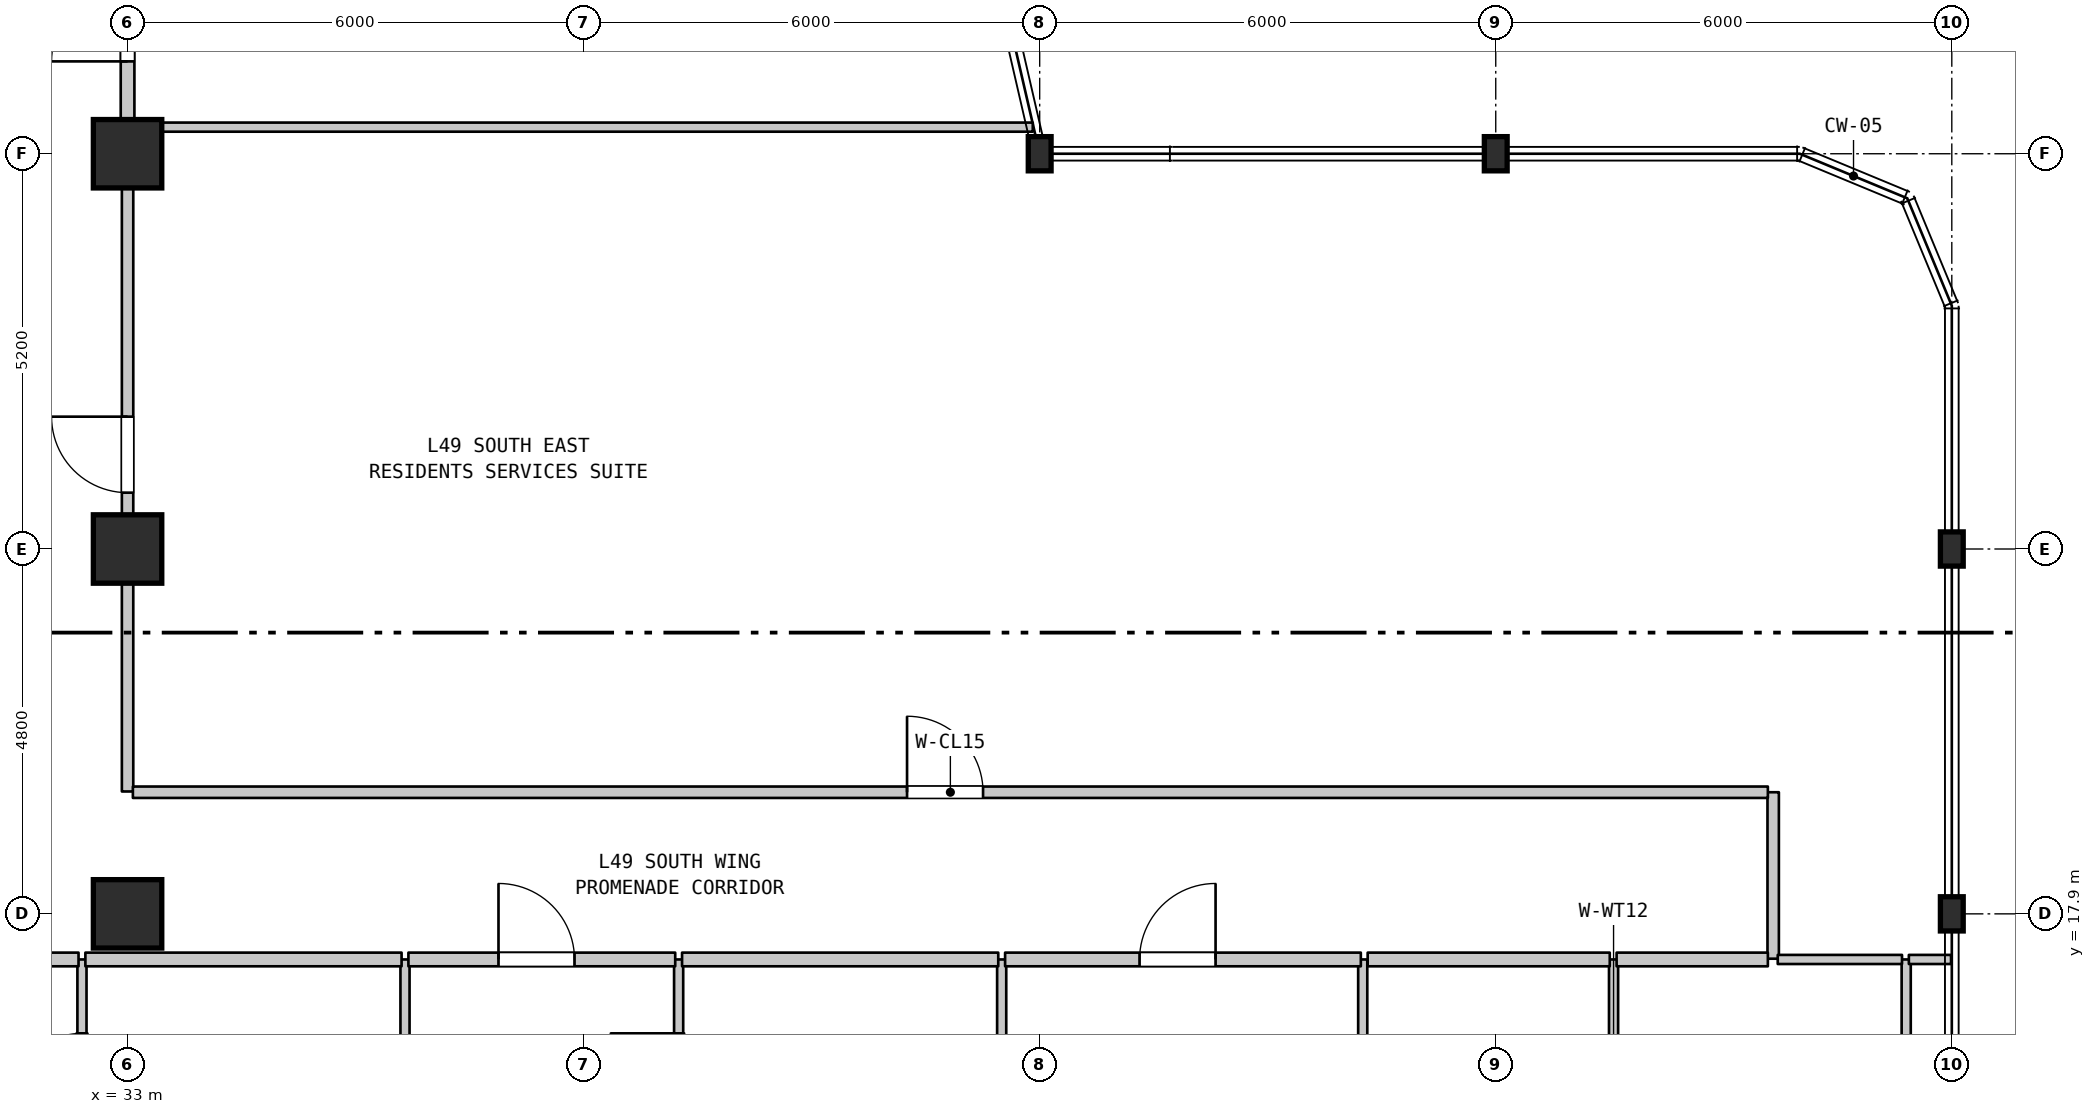
"""IFC4 building model, lengths in metres.
Left out: names, types, materials, properties, quantities, classifications, styles, units other than length and angle.
Written with IfcOpenShell. Run it as: python <this file> out.ifc"""

import sys

from ifc_helpers import new_model, si_unit, direction, frame, frame_2d, origin, origin_2d, place, context, subcontext, project, spatial, rectangle, i_section, extrude, element, fill, save


model = new_model("IFC4")
c1 = context("Model", 3, precision=1e-05, world=origin(), true_north=direction((0.0, 1.0)))
c2 = subcontext(c1, "Body", "Model", "MODEL_VIEW")
j1 = project(units=[si_unit("LENGTHUNIT", "METRE"), si_unit("PLANEANGLEUNIT", "RADIAN")], contexts=[c1])
p1 = place(None, origin())
s1 = spatial("IfcSite", under=j1, at=p1, CompositionType="ELEMENT")
p2 = place(p1, origin())
s2 = spatial("IfcBuilding", under=s1, at=p2, CompositionType="ELEMENT")
p3 = place(p2, frame((0.0, 0.0, 199.5)))
s3 = spatial("IfcBuildingStorey", under=s2, at=p3, CompositionType="ELEMENT", Elevation=199.5)
for number, where, z_axis, x_axis in (
    (1, (33.0, 17.9, 0.0), (0.0, 0.0, 1.0), (1.0, 0.0, 0.0)),
    (2, (33.0, 22.7, 0.0), (0.0, 0.0, 1.0), (1.0, 0.0, 0.0)),
    (3, (33.0, 27.9, 0.0), (0.0, 0.0, 1.0), (1.0, 0.0, 0.0)),
):
    element("IfcColumn", number, at=place(p3, frame(where, z_axis=z_axis, x_axis=x_axis)), inside=s3, PredefinedType="COLUMN", context=c2, shape_type="SweptSolid", body=[
        extrude(rectangle(XDim=0.9, YDim=0.9, at=origin_2d()), origin(), (0.0, 0.0, 1.0), 3.7),
    ])
for number, where, z_axis, x_axis in (
    (4, (45.0, 27.9, 0.0), (0.0, 0.0, 1.0), (1.0, 0.0, 0.0)),
    (5, (51.0, 27.9, 0.0), (0.0, 0.0, 1.0), (1.0, 0.0, 0.0)),
    (6, (57.0, 17.9, 0.0), (0.0, 0.0, 1.0), (1.0, 0.0, 0.0)),
    (7, (57.0, 22.7, 0.0), (0.0, 0.0, 1.0), (1.0, 0.0, 0.0)),
):
    element("IfcColumn", number, at=place(p3, frame(where, z_axis=z_axis, x_axis=x_axis)), inside=s3, PredefinedType="COLUMN", context=c2, shape_type="SweptSolid", body=[
        extrude(i_section(OverallWidth=0.3, OverallDepth=0.45, WebThickness=0.014, FlangeThickness=0.026, FilletRadius=0.027, at=origin_2d()), origin(), (0.0, 0.0, 1.0), 3.7),
    ])
p4 = place(p3, frame((32.4, 14.6, 0.0), z_axis=(0.0, 0.0, 1.0), x_axis=(0.0, 1.0, 0.0)))
e8 = element("IfcWall", 8, at=p4, inside=s3, PredefinedType="PARTITIONING", context=c2, shape_type="SweptSolid", body=[
    extrude(rectangle(XDim=2.7, YDim=0.12, at=frame_2d((1.35, 0.0))), origin(), (0.0, 0.0, 1.0), 3.39),
])
p5 = place(p4, frame((0.828, 0.0, 0.0)))
e9 = element("IfcOpeningElement", 9, at=p5, cuts=e8, PredefinedType="OPENING", context=c2, shape_type="SweptSolid", body=[
    extrude(rectangle(XDim=0.9, YDim=2.1, at=frame_2d((0.45, 1.05))), frame((0.0, 0.07, 0.0), z_axis=(0.0, -1.0, 0.0), x_axis=(1.0, 0.0, 0.0)), (0.0, 0.0, 1.0), 0.14),
])
p6 = place(p3, frame((33.0, 19.51, 0.0), z_axis=(0.0, 0.0, 1.0), x_axis=(0.0, 1.0, 0.0)))
e10 = element("IfcWall", 10, at=p6, inside=s3, PredefinedType="STANDARD", context=c2, shape_type="SweptSolid", body=[
    extrude(rectangle(XDim=8.72, YDim=0.15, at=frame_2d((4.36, 0.0))), origin(), (0.0, 0.0, 1.0), 2.99),
])
p7 = place(p6, frame((3.931, 0.0, 0.0)))
e11 = element("IfcOpeningElement", 11, at=p7, cuts=e10, PredefinedType="OPENING", context=c2, shape_type="SweptSolid", body=[
    extrude(rectangle(XDim=1.0, YDim=2.15, at=frame_2d((0.5, 1.075))), frame((0.0, 0.085, 0.0), z_axis=(0.0, -1.0, 0.0), x_axis=(1.0, 0.0, 0.0)), (0.0, 0.0, 1.0), 0.17),
])
p8 = place(p3, frame((33.0, 28.24, 0.0), z_axis=(0.0, 0.0, 1.0), x_axis=(0.0, 1.0, 0.0)))
e12 = element("IfcWall", 12, at=p8, inside=s3, PredefinedType="STANDARD", context=c2, shape_type="SweptSolid", body=[
    extrude(rectangle(XDim=2.75, YDim=0.18, at=frame_2d((1.375, 0.0))), origin(), (0.0, 0.0, 1.0), 2.89),
])
p9 = place(p8, frame((0.875, 0.0, 0.0)))
e13 = element("IfcOpeningElement", 13, at=p9, cuts=e12, PredefinedType="OPENING", context=c2, shape_type="SweptSolid", body=[
    extrude(rectangle(XDim=1.0, YDim=2.15, at=frame_2d((0.5, 1.075))), frame((0.0, 0.1, 0.0), z_axis=(0.0, -1.0, 0.0), x_axis=(1.0, 0.0, 0.0)), (0.0, 0.0, 1.0), 0.2),
])
p10 = place(p3, frame((36.65, 14.6, 0.0), z_axis=(0.0, 0.0, 1.0), x_axis=(0.0, 1.0, 0.0)))
e14 = element("IfcWall", 14, at=p10, inside=s3, PredefinedType="PARTITIONING", context=c2, shape_type="SweptSolid", body=[
    extrude(rectangle(XDim=2.7, YDim=0.12, at=frame_2d((1.35, 0.0))), origin(), (0.0, 0.0, 1.0), 3.39),
])
p11 = place(p3, frame((40.25, 14.6, 0.0), z_axis=(0.0, 0.0, 1.0), x_axis=(0.0, 1.0, 0.0)))
e15 = element("IfcWall", 15, at=p11, inside=s3, PredefinedType="PARTITIONING", context=c2, shape_type="SweptSolid", body=[
    extrude(rectangle(XDim=2.7, YDim=0.12, at=frame_2d((1.35, 0.0))), origin(), (0.0, 0.0, 1.0), 3.39),
])
p12 = place(p11, frame((0.828, 0.0, 0.0)))
e16 = element("IfcOpeningElement", 16, at=p12, cuts=e15, PredefinedType="OPENING", context=c2, shape_type="SweptSolid", body=[
    extrude(rectangle(XDim=0.9, YDim=2.1, at=frame_2d((0.45, 1.05))), frame((0.0, 0.07, 0.0), z_axis=(0.0, -1.0, 0.0), x_axis=(1.0, 0.0, 0.0)), (0.0, 0.0, 1.0), 0.14),
])
p13 = place(p3, frame((44.5, 14.85, 0.0), z_axis=(0.0, 0.0, 1.0), x_axis=(0.0, 1.0, 0.0)))
e17 = element("IfcWall", 17, at=p13, inside=s3, PredefinedType="PARTITIONING", context=c2, shape_type="SweptSolid", body=[
    extrude(rectangle(XDim=2.45, YDim=0.12, at=frame_2d((1.225, 0.0))), origin(), (0.0, 0.0, 1.0), 3.39),
])
for number, where, z_axis, x_axis in (
    (18, (49.25, 11.15, 0.0), (0.0, 0.0, 1.0), (0.0, 1.0, 0.0)),
    (19, (52.55, 11.15, 0.0), (0.0, 0.0, 1.0), (0.0, 1.0, 0.0)),
):
    element("IfcWall", number, at=place(p3, frame(where, z_axis=z_axis, x_axis=x_axis)), inside=s3, PredefinedType="PARTITIONING", context=c2, shape_type="SweptSolid", body=[
        extrude(rectangle(XDim=6.15, YDim=0.12, at=frame_2d((3.075, 0.0))), origin(), (0.0, 0.0, 1.0), 3.39),
    ])
p14 = place(p3, frame((54.65, 17.31, 0.0), z_axis=(0.0, 0.0, 1.0), x_axis=(0.0, 1.0, 0.0)))
e20 = element("IfcWall", 20, at=p14, inside=s3, PredefinedType="STANDARD", context=c2, shape_type="SweptSolid", body=[
    extrude(rectangle(XDim=2.19, YDim=0.15, at=frame_2d((1.095, 0.0))), origin(), (0.0, 0.0, 1.0), 3.39),
])
p15 = place(p3, frame((56.4, 11.15, 0.0), z_axis=(0.0, 0.0, 1.0), x_axis=(0.0, 1.0, 0.0)))
e21 = element("IfcWall", 21, at=p15, inside=s3, PredefinedType="PARTITIONING", context=c2, shape_type="SweptSolid", body=[
    extrude(rectangle(XDim=6.15, YDim=0.12, at=frame_2d((3.075, 0.0))), origin(), (0.0, 0.0, 1.0), 3.39),
])
p16 = place(p3, frame((28.845, 17.3, 0.0), z_axis=(0.0, 0.0, 1.0), x_axis=(1.0, 0.0, 0.0)))
e22 = element("IfcWall", 22, at=p16, inside=s3, PredefinedType="STANDARD", context=c2, shape_type="SweptSolid", body=[
    extrude(rectangle(XDim=3.51, YDim=0.18, at=frame_2d((1.755, 0.0))), origin(), (0.0, 0.0, 1.0), 3.39),
])
p17 = place(p16, frame((1.255, 0.0, 0.0)))
e23 = element("IfcOpeningElement", 23, at=p17, cuts=e22, PredefinedType="OPENING", context=c2, shape_type="SweptSolid", body=[
    extrude(rectangle(XDim=1.0, YDim=2.15, at=frame_2d((0.5, 1.075))), frame((0.0, 0.1, 0.0), z_axis=(0.0, -1.0, 0.0), x_axis=(1.0, 0.0, 0.0)), (0.0, 0.0, 1.0), 0.2),
])
p18 = place(p3, frame((32.445, 17.3, 0.0), z_axis=(0.0, 0.0, 1.0), x_axis=(1.0, 0.0, 0.0)))
e24 = element("IfcWall", 24, at=p18, inside=s3, PredefinedType="STANDARD", context=c2, shape_type="SweptSolid", body=[
    extrude(rectangle(XDim=4.16, YDim=0.18, at=frame_2d((2.08, 0.0))), origin(), (0.0, 0.0, 1.0), 3.39),
])
p19 = place(p3, frame((36.695, 17.3, 0.0), z_axis=(0.0, 0.0, 1.0), x_axis=(1.0, 0.0, 0.0)))
e25 = element("IfcWall", 25, at=p19, inside=s3, PredefinedType="STANDARD", context=c2, shape_type="SweptSolid", body=[
    extrude(rectangle(XDim=3.51, YDim=0.18, at=frame_2d((1.755, 0.0))), origin(), (0.0, 0.0, 1.0), 3.39),
])
p20 = place(p19, frame((1.185, 0.0, 0.0)))
e26 = element("IfcOpeningElement", 26, at=p20, cuts=e25, PredefinedType="OPENING", context=c2, shape_type="SweptSolid", body=[
    extrude(rectangle(XDim=1.0, YDim=2.15, at=frame_2d((0.5, 1.075))), frame((0.0, 0.1, 0.0), z_axis=(0.0, -1.0, 0.0), x_axis=(1.0, 0.0, 0.0)), (0.0, 0.0, 1.0), 0.2),
])
p21 = place(p3, frame((40.295, 17.3, 0.0), z_axis=(0.0, 0.0, 1.0), x_axis=(1.0, 0.0, 0.0)))
e27 = element("IfcWall", 27, at=p21, inside=s3, PredefinedType="STANDARD", context=c2, shape_type="SweptSolid", body=[
    extrude(rectangle(XDim=4.16, YDim=0.18, at=frame_2d((2.08, 0.0))), origin(), (0.0, 0.0, 1.0), 3.39),
])
p22 = place(p3, frame((44.545, 17.3, 0.0), z_axis=(0.0, 0.0, 1.0), x_axis=(1.0, 0.0, 0.0)))
e28 = element("IfcWall", 28, at=p22, inside=s3, PredefinedType="STANDARD", context=c2, shape_type="SweptSolid", body=[
    extrude(rectangle(XDim=4.68, YDim=0.18, at=frame_2d((2.34, 0.0))), origin(), (0.0, 0.0, 1.0), 3.39),
])
p23 = place(p22, frame((1.769, 0.0, 0.0)))
e29 = element("IfcOpeningElement", 29, at=p23, cuts=e28, PredefinedType="OPENING", context=c2, shape_type="SweptSolid", body=[
    extrude(rectangle(XDim=1.0, YDim=2.15, at=frame_2d((0.5, 1.075))), frame((0.0, 0.1, 0.0), z_axis=(0.0, -1.0, 0.0), x_axis=(1.0, 0.0, 0.0)), (0.0, 0.0, 1.0), 0.2),
])
p24 = place(p3, frame((49.315, 17.3, 0.0), z_axis=(0.0, 0.0, 1.0), x_axis=(1.0, 0.0, 0.0)))
e30 = element("IfcWall", 30, at=p24, inside=s3, PredefinedType="STANDARD", context=c2, shape_type="SweptSolid", body=[
    extrude(rectangle(XDim=3.185, YDim=0.18, at=frame_2d((1.593, 0.0))), origin(), (0.0, 0.0, 1.0), 3.39),
])
p25 = place(p3, frame((52.59, 17.3, 0.0), z_axis=(0.0, 0.0, 1.0), x_axis=(1.0, 0.0, 0.0)))
e31 = element("IfcWall", 31, at=p25, inside=s3, PredefinedType="STANDARD", context=c2, shape_type="SweptSolid", body=[
    extrude(rectangle(XDim=1.99, YDim=0.18, at=frame_2d((0.995, 0.0))), origin(), (0.0, 0.0, 1.0), 3.39),
])
p26 = place(p3, frame((54.71, 17.3, 0.0), z_axis=(0.0, 0.0, 1.0), x_axis=(1.0, 0.0, 0.0)))
e32 = element("IfcWall", 32, at=p26, inside=s3, PredefinedType="PARTITIONING", context=c2, shape_type="SweptSolid", body=[
    extrude(rectangle(XDim=1.635, YDim=0.12, at=frame_2d((0.817, 0.0))), origin(), (0.0, 0.0, 1.0), 3.39),
])
p27 = place(p3, frame((56.435, 17.3, 0.0), z_axis=(0.0, 0.0, 1.0), x_axis=(1.0, 0.0, 0.0)))
e33 = element("IfcWall", 33, at=p27, inside=s3, PredefinedType="PARTITIONING", context=c2, shape_type="SweptSolid", body=[
    extrude(rectangle(XDim=0.555, YDim=0.12, at=frame_2d((0.277, 0.0))), origin(), (0.0, 0.0, 1.0), 3.39),
])
p28 = place(p3, frame((33.07, 19.5, 0.0), z_axis=(0.0, 0.0, 1.0), x_axis=(1.0, 0.0, 0.0)))
e34 = element("IfcWall", 34, at=p28, inside=s3, PredefinedType="STANDARD", context=c2, shape_type="SweptSolid", body=[
    extrude(rectangle(XDim=21.51, YDim=0.15, at=frame_2d((10.755, 0.0))), origin(), (0.0, 0.0, 1.0), 3.39),
])
p29 = place(p28, frame((10.185, 0.0, 0.0)))
e35 = element("IfcOpeningElement", 35, at=p29, cuts=e34, PredefinedType="OPENING", context=c2, shape_type="SweptSolid", body=[
    extrude(rectangle(XDim=1.0, YDim=2.15, at=frame_2d((0.5, 1.075))), frame((0.0, 0.085, 0.0), z_axis=(0.0, -1.0, 0.0), x_axis=(1.0, 0.0, 0.0)), (0.0, 0.0, 1.0), 0.17),
])
p30 = place(p3, frame((33.085, 28.25, 0.0), z_axis=(0.0, 0.0, 1.0), x_axis=(1.0, 0.0, 0.0)))
e36 = element("IfcWall", 36, at=p30, inside=s3, PredefinedType="PARTITIONING", context=c2, shape_type="SweptSolid", body=[
    extrude(rectangle(XDim=11.824, YDim=0.12, at=frame_2d((5.912, 0.0))), origin(), (0.0, 0.0, 1.0), 3.39),
])
p31 = place(p5, origin())
e37 = element("IfcDoor", 37, at=p31, inside=s3, OperationType="SINGLE_SWING_LEFT", PredefinedType="DOOR", context=c2, shape_type="SweptSolid", body=[
    extrude(rectangle(XDim=0.9, YDim=2.1, at=frame_2d((0.45, 1.05))), frame((0.0, 0.025, 0.0), z_axis=(0.0, -1.0, 0.0), x_axis=(1.0, 0.0, 0.0)), (0.0, 0.0, 1.0), 0.05),
])
fill(e9, e37)
p32 = place(p7, origin())
e38 = element("IfcDoor", 38, at=p32, inside=s3, OperationType="SINGLE_SWING_RIGHT", PredefinedType="DOOR", context=c2, shape_type="SweptSolid", body=[
    extrude(rectangle(XDim=1.0, YDim=2.15, at=frame_2d((0.5, 1.075))), frame((0.0, 0.025, 0.0), z_axis=(0.0, -1.0, 0.0), x_axis=(1.0, 0.0, 0.0)), (0.0, 0.0, 1.0), 0.05),
])
fill(e11, e38)
p33 = place(p9, origin())
e39 = element("IfcDoor", 39, at=p33, inside=s3, OperationType="SINGLE_SWING_LEFT", PredefinedType="DOOR", context=c2, shape_type="SweptSolid", body=[
    extrude(rectangle(XDim=1.0, YDim=2.15, at=frame_2d((0.5, 1.075))), frame((0.0, 0.025, 0.0), z_axis=(0.0, -1.0, 0.0), x_axis=(1.0, 0.0, 0.0)), (0.0, 0.0, 1.0), 0.05),
])
fill(e13, e39)
p34 = place(p12, origin())
e40 = element("IfcDoor", 40, at=p34, inside=s3, OperationType="SINGLE_SWING_RIGHT", PredefinedType="DOOR", context=c2, shape_type="SweptSolid", body=[
    extrude(rectangle(XDim=0.9, YDim=2.1, at=frame_2d((0.45, 1.05))), frame((0.0, 0.025, 0.0), z_axis=(0.0, -1.0, 0.0), x_axis=(1.0, 0.0, 0.0)), (0.0, 0.0, 1.0), 0.05),
])
fill(e16, e40)
p35 = place(p20, origin())
e41 = element("IfcDoor", 41, at=p35, inside=s3, OperationType="SINGLE_SWING_LEFT", PredefinedType="DOOR", context=c2, shape_type="SweptSolid", body=[
    extrude(rectangle(XDim=1.0, YDim=2.15, at=frame_2d((0.5, 1.075))), frame((0.0, 0.025, 0.0), z_axis=(0.0, -1.0, 0.0), x_axis=(1.0, 0.0, 0.0)), (0.0, 0.0, 1.0), 0.05),
])
fill(e26, e41)
p36 = place(p23, origin())
e42 = element("IfcDoor", 42, at=p36, inside=s3, OperationType="SINGLE_SWING_RIGHT", PredefinedType="DOOR", context=c2, shape_type="SweptSolid", body=[
    extrude(rectangle(XDim=1.0, YDim=2.15, at=frame_2d((0.5, 1.075))), frame((0.0, 0.025, 0.0), z_axis=(0.0, -1.0, 0.0), x_axis=(1.0, 0.0, 0.0)), (0.0, 0.0, 1.0), 0.05),
])
fill(e29, e42)
p37 = place(p29, origin())
e43 = element("IfcDoor", 43, at=p37, inside=s3, OperationType="SINGLE_SWING_LEFT", PredefinedType="DOOR", context=c2, shape_type="SweptSolid", body=[
    extrude(rectangle(XDim=1.0, YDim=2.15, at=frame_2d((0.5, 1.075))), frame((0.0, 0.025, 0.0), z_axis=(0.0, -1.0, 0.0), x_axis=(1.0, 0.0, 0.0)), (0.0, 0.0, 1.0), 0.05),
])
fill(e35, e43)
save(model, sys.argv[1])
